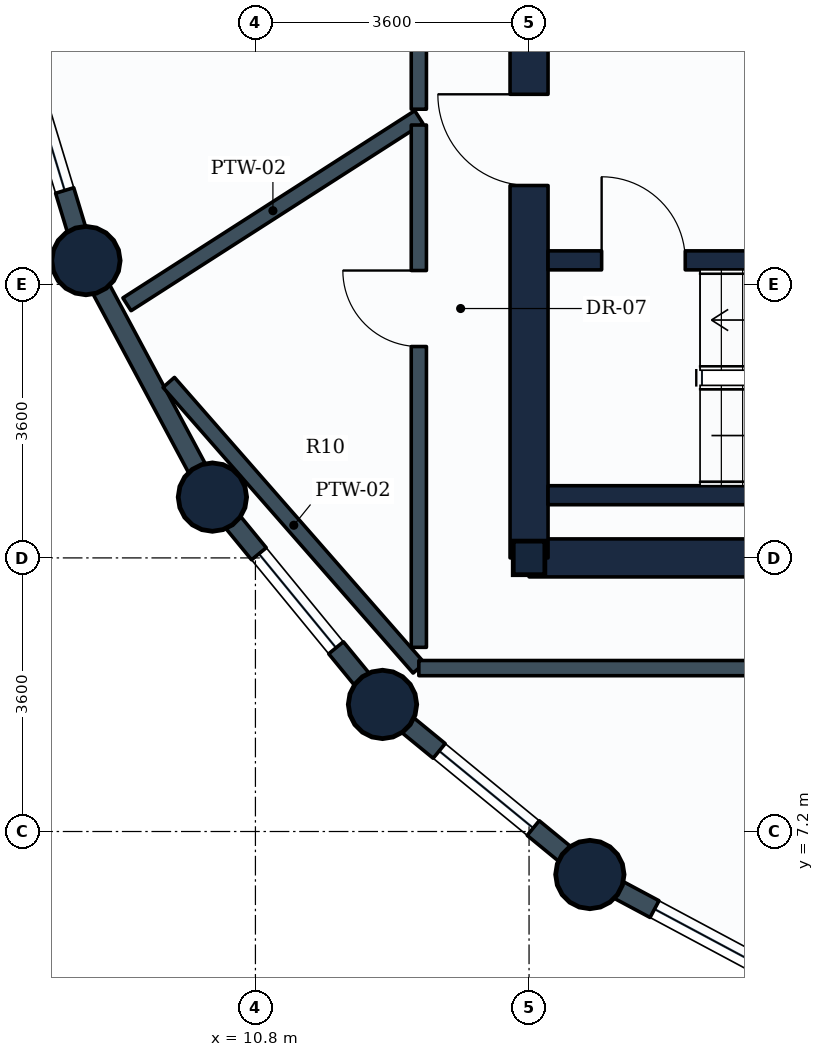
"""IFC4 building model, lengths in metres.
Left out: names, types, materials, properties, quantities, classifications, styles, units other than length and angle.
Written with IfcOpenShell. Run it as: python <this file> out.ifc"""

import sys

from ifc_helpers import new_model, si_unit, direction, frame, frame_2d, origin, origin_2d, place, context, subcontext, project, spatial, rectangle, circle, i_section, extrude, element, fill, save


model = new_model("IFC4")
c1 = context("Model", 3, precision=1e-05, world=origin(), true_north=direction((0.0, 1.0)))
c2 = subcontext(c1, "Body", "Model", "MODEL_VIEW")
j1 = project(units=[si_unit("LENGTHUNIT", "METRE"), si_unit("PLANEANGLEUNIT", "RADIAN")], contexts=[c1])
p1 = place(None, origin())
s1 = spatial("IfcSite", under=j1, at=p1, CompositionType="ELEMENT")
p2 = place(p1, origin())
s2 = spatial("IfcBuilding", under=s1, at=p2, CompositionType="ELEMENT")
p3 = place(p2, frame((0.0, 0.0, 178.6)))
s3 = spatial("IfcBuildingStorey", under=s2, at=p3, CompositionType="ELEMENT", Elevation=178.6)
for number, where, z_axis, x_axis in (
    (1, (8.57, 14.712, 0.0), (0.0, 0.0, 1.0), (1.0, 0.0, 0.0)),
    (2, (10.234, 11.6, 0.0), (0.0, 0.0, 1.0), (1.0, 0.0, 0.0)),
    (3, (12.472, 8.872, 0.0), (0.0, 0.0, 1.0), (1.0, 0.0, 0.0)),
):
    element("IfcColumn", number, at=place(p3, frame(where, z_axis=z_axis, x_axis=x_axis)), inside=s3, PredefinedType="COLUMN", context=c2, shape_type="SweptSolid", body=[
        extrude(circle(Radius=0.45, at=origin_2d()), origin(), (0.0, 0.0, 1.0), 3.8),
    ])
p4 = place(p3, frame((14.4, 10.8, 0.0), z_axis=(0.0, 0.0, 1.0), x_axis=(1.0, 0.0, 0.0)))
e4 = element("IfcColumn", 4, at=p4, inside=s3, PredefinedType="COLUMN", context=c2, shape_type="SweptSolid", body=[
    extrude(i_section(OverallWidth=0.416, OverallDepth=0.442, WebThickness=0.025, FlangeThickness=0.041, FilletRadius=0.015, at=origin_2d()), origin(), (0.0, 0.0, 1.0), 3.8),
])
p5 = place(p3, frame((15.2, 6.634, 0.0), z_axis=(0.0, 0.0, 1.0), x_axis=(1.0, 0.0, 0.0)))
e5 = element("IfcColumn", 5, at=p5, inside=s3, PredefinedType="COLUMN", context=c2, shape_type="SweptSolid", body=[
    extrude(circle(Radius=0.45, at=origin_2d()), origin(), (0.0, 0.0, 1.0), 3.8),
])
p6 = place(p3, frame((8.57, 14.712, 0.0), z_axis=(0.0, 0.0, 1.0), x_axis=(-0.290305086481, 0.956934144423, 0.0)))
e6 = element("IfcWall", 6, at=p6, inside=s3, PredefinedType="STANDARD", context=c2, shape_type="SweptSolid", body=[
    extrude(rectangle(XDim=3.528, YDim=0.25, at=frame_2d((1.764, 0.0))), origin(), (0.0, 0.0, 1.0), 2.93),
])
p7 = place(p6, frame((0.964, 0.0, 0.85)))
e7 = element("IfcOpeningElement", 7, at=p7, cuts=e6, PredefinedType="OPENING", context=c2, shape_type="SweptSolid", body=[
    extrude(rectangle(XDim=1.6, YDim=1.35, at=frame_2d((0.8, 0.675))), frame((0.0, 0.135, 0.0), z_axis=(0.0, -1.0, 0.0), x_axis=(1.0, 0.0, 0.0)), (0.0, 0.0, 1.0), 0.27),
])
p8 = place(p3, frame((10.234, 11.6, 0.0), z_axis=(0.0, 0.0, 1.0), x_axis=(-0.47151087309, 0.881860247748, 0.0)))
e8 = element("IfcWall", 8, at=p8, inside=s3, PredefinedType="STANDARD", context=c2, shape_type="SweptSolid", body=[
    extrude(rectangle(XDim=3.529, YDim=0.25, at=frame_2d((1.764, 0.0))), origin(), (0.0, 0.0, 1.0), 2.93),
])
p9 = place(p3, frame((12.472, 8.872, 0.0), z_axis=(0.0, 0.0, 1.0), x_axis=(-0.634258295121, 0.773121216285, 0.0)))
e9 = element("IfcWall", 9, at=p9, inside=s3, PredefinedType="STANDARD", context=c2, shape_type="SweptSolid", body=[
    extrude(rectangle(XDim=3.529, YDim=0.25, at=frame_2d((1.764, 0.0))), origin(), (0.0, 0.0, 1.0), 2.93),
])
p10 = place(p9, frame((0.964, 0.0, 0.85)))
e10 = element("IfcOpeningElement", 10, at=p10, cuts=e9, PredefinedType="OPENING", context=c2, shape_type="SweptSolid", body=[
    extrude(rectangle(XDim=1.6, YDim=1.35, at=frame_2d((0.8, 0.675))), frame((0.0, 0.135, 0.0), z_axis=(0.0, -1.0, 0.0), x_axis=(1.0, 0.0, 0.0)), (0.0, 0.0, 1.0), 0.27),
])
p11 = place(p3, frame((15.2, 6.634, 0.0), z_axis=(0.0, 0.0, 1.0), x_axis=(-0.773121216285, 0.634258295121, 0.0)))
e11 = element("IfcWall", 11, at=p11, inside=s3, PredefinedType="STANDARD", context=c2, shape_type="SweptSolid", body=[
    extrude(rectangle(XDim=3.529, YDim=0.25, at=frame_2d((1.764, 0.0))), origin(), (0.0, 0.0, 1.0), 2.93),
])
p12 = place(p11, frame((0.964, 0.0, 0.85)))
e12 = element("IfcOpeningElement", 12, at=p12, cuts=e11, PredefinedType="OPENING", context=c2, shape_type="SweptSolid", body=[
    extrude(rectangle(XDim=1.6, YDim=1.35, at=frame_2d((0.8, 0.675))), frame((0.0, 0.135, 0.0), z_axis=(0.0, -1.0, 0.0), x_axis=(1.0, 0.0, 0.0)), (0.0, 0.0, 1.0), 0.27),
])
p13 = place(p3, frame((18.312, 4.97, 0.0), z_axis=(0.0, 0.0, 1.0), x_axis=(-0.881846862014, 0.471535907389, 0.0)))
e13 = element("IfcWall", 13, at=p13, inside=s3, PredefinedType="STANDARD", context=c2, shape_type="SweptSolid", body=[
    extrude(rectangle(XDim=3.529, YDim=0.25, at=frame_2d((1.765, 0.0))), origin(), (0.0, 0.0, 1.0), 2.93),
])
p14 = place(p13, frame((0.964, 0.0, 0.85)))
e14 = element("IfcOpeningElement", 14, at=p14, cuts=e13, PredefinedType="OPENING", context=c2, shape_type="SweptSolid", body=[
    extrude(rectangle(XDim=1.6, YDim=1.35, at=frame_2d((0.8, 0.675))), frame((0.0, 0.135, 0.0), z_axis=(0.0, -1.0, 0.0), x_axis=(1.0, 0.0, 0.0)), (0.0, 0.0, 1.0), 0.27),
])
p15 = place(p3, frame((14.4, 10.8, 0.0), z_axis=(0.0, 0.0, 1.0), x_axis=(1.0, 0.0, 0.0)))
e15 = element("IfcWall", 15, at=p15, inside=s3, PredefinedType="SHEAR", context=c2, shape_type="SweptSolid", body=[
    extrude(rectangle(XDim=18.0, YDim=0.5, at=frame_2d((9.0, 0.0))), origin(), (0.0, 0.0, 1.0), 3.55),
])
p16 = place(p3, frame((14.4, 10.8, 0.0), z_axis=(0.0, 0.0, 1.0), x_axis=(0.0, 1.0, 0.0)))
e16 = element("IfcWall", 16, at=p16, inside=s3, PredefinedType="SHEAR", context=c2, shape_type="SweptSolid", body=[
    extrude(rectangle(XDim=14.4, YDim=0.5, at=frame_2d((7.2, 0.0))), origin(), (0.0, 0.0, 1.0), 3.55),
])
p17 = place(p16, frame((11.05, 0.0, 0.0)))
e17 = element("IfcOpeningElement", 17, at=p17, cuts=e16, PredefinedType="OPENING", context=c2, shape_type="SweptSolid", body=[
    extrude(rectangle(XDim=1.1, YDim=2.1, at=frame_2d((0.55, 1.05))), frame((0.0, 0.26, 0.0), z_axis=(0.0, -1.0, 0.0), x_axis=(1.0, 0.0, 0.0)), (0.0, 0.0, 1.0), 0.52),
])
p18 = place(p16, frame((4.9, 0.0, 0.0)))
e18 = element("IfcOpeningElement", 18, at=p18, cuts=e16, PredefinedType="OPENING", context=c2, shape_type="SweptSolid", body=[
    extrude(rectangle(XDim=1.2, YDim=2.1, at=frame_2d((0.6, 1.05))), frame((0.0, 0.26, 0.0), z_axis=(0.0, -1.0, 0.0), x_axis=(1.0, 0.0, 0.0)), (0.0, 0.0, 1.0), 0.52),
])
p19 = place(p16, frame((7.5, 0.0, 0.0)))
e19 = element("IfcOpeningElement", 19, at=p19, cuts=e16, PredefinedType="OPENING", context=c2, shape_type="SweptSolid", body=[
    extrude(rectangle(XDim=0.85, YDim=2.1, at=frame_2d((0.425, 1.05))), frame((0.0, 0.26, 0.0), z_axis=(0.0, -1.0, 0.0), x_axis=(1.0, 0.0, 0.0)), (0.0, 0.0, 1.0), 0.52),
])
p20 = place(p3, frame((14.65, 11.625, 0.0), z_axis=(0.0, 0.0, 1.0), x_axis=(1.0, 0.0, 0.0)))
e20 = element("IfcWall", 20, at=p20, inside=s3, PredefinedType="SHEAR", context=c2, shape_type="SweptSolid", body=[
    extrude(rectangle(XDim=8.7, YDim=0.25, at=frame_2d((4.35, 0.0))), origin(), (0.0, 0.0, 1.0), 3.55),
])
p21 = place(p3, frame((14.65, 14.715, 0.0), z_axis=(0.0, 0.0, 1.0), x_axis=(1.0, 0.0, 0.0)))
e21 = element("IfcWall", 21, at=p21, inside=s3, PredefinedType="SHEAR", context=c2, shape_type="SweptSolid", body=[
    extrude(rectangle(XDim=8.7, YDim=0.25, at=frame_2d((4.35, 0.0))), origin(), (0.0, 0.0, 1.0), 3.55),
])
p22 = place(p21, frame((0.705, 0.0, 0.0)))
e22 = element("IfcOpeningElement", 22, at=p22, cuts=e21, PredefinedType="OPENING", context=c2, shape_type="SweptSolid", body=[
    extrude(rectangle(XDim=1.1, YDim=2.1, at=frame_2d((0.55, 1.05))), frame((0.0, 0.135, 0.0), z_axis=(0.0, -1.0, 0.0), x_axis=(1.0, 0.0, 0.0)), (0.0, 0.0, 1.0), 0.27),
])
p23 = place(p3, frame((12.95, 9.35, 0.0), z_axis=(0.0, 0.0, 1.0), x_axis=(-0.658639514157, 0.752458630352, 0.0)))
e23 = element("IfcWall", 23, at=p23, inside=s3, PredefinedType="PARTITIONING", context=c2, shape_type="SweptSolid", body=[
    extrude(rectangle(XDim=4.996, YDim=0.2, at=frame_2d((2.498, 0.0))), origin(), (0.0, 0.0, 1.0), 2.93),
])
p24 = place(p3, frame((12.95, 16.6, 0.0), z_axis=(0.0, 0.0, 1.0), x_axis=(-0.841685822078, -0.539967570242, 0.0)))
e24 = element("IfcWall", 24, at=p24, inside=s3, PredefinedType="PARTITIONING", context=c2, shape_type="SweptSolid", body=[
    extrude(rectangle(XDim=4.562, YDim=0.2, at=frame_2d((2.281, 0.0))), origin(), (0.0, 0.0, 1.0), 2.93),
])
p25 = place(p3, frame((12.95, 16.704, 0.0), z_axis=(0.0, 0.0, 1.0), x_axis=(0.0, 1.0, 0.0)))
e25 = element("IfcWall", 25, at=p25, inside=s3, PredefinedType="PARTITIONING", context=c2, shape_type="SweptSolid", body=[
    extrude(rectangle(XDim=8.417, YDim=0.2, at=frame_2d((4.208, 0.0))), origin(), (0.0, 0.0, 1.0), 3.22),
])
p26 = place(p25, frame((3.696, 0.0, 0.0)))
e26 = element("IfcOpeningElement", 26, at=p26, cuts=e25, PredefinedType="OPENING", context=c2, shape_type="SweptSolid", body=[
    extrude(rectangle(XDim=1.0, YDim=2.1, at=frame_2d((0.5, 1.05))), frame((0.0, 0.11, 0.0), z_axis=(0.0, -1.0, 0.0), x_axis=(1.0, 0.0, 0.0)), (0.0, 0.0, 1.0), 0.22),
])
p27 = place(p3, frame((12.95, 9.623, 0.0), z_axis=(0.0, 0.0, 1.0), x_axis=(0.0, 1.0, 0.0)))
e27 = element("IfcWall", 27, at=p27, inside=s3, PredefinedType="PARTITIONING", context=c2, shape_type="SweptSolid", body=[
    extrude(rectangle(XDim=6.873, YDim=0.2, at=frame_2d((3.437, 0.0))), origin(), (0.0, 0.0, 1.0), 3.17),
])
p28 = place(p27, frame((3.958, 0.0, 0.0)))
e28 = element("IfcOpeningElement", 28, at=p28, cuts=e27, PredefinedType="OPENING", context=c2, shape_type="SweptSolid", body=[
    extrude(rectangle(XDim=1.0, YDim=2.1, at=frame_2d((0.5, 1.05))), frame((0.0, 0.11, 0.0), z_axis=(0.0, -1.0, 0.0), x_axis=(1.0, 0.0, 0.0)), (0.0, 0.0, 1.0), 0.22),
])
p29 = place(p3, frame((12.95, 9.35, 0.0), z_axis=(0.0, 0.0, 1.0), x_axis=(1.0, 0.0, 0.0)))
e29 = element("IfcWall", 29, at=p29, inside=s3, PredefinedType="PARTITIONING", context=c2, shape_type="SweptSolid", body=[
    extrude(rectangle(XDim=15.771, YDim=0.2, at=frame_2d((7.885, 0.0))), origin(), (0.0, 0.0, 1.0), 3.17),
])
p30 = place(p29, frame((4.836, 0.0, 0.0)))
e30 = element("IfcOpeningElement", 30, at=p30, cuts=e29, PredefinedType="OPENING", context=c2, shape_type="SweptSolid", body=[
    extrude(rectangle(XDim=1.0, YDim=2.1, at=frame_2d((0.5, 1.05))), frame((0.0, 0.11, 0.0), z_axis=(0.0, -1.0, 0.0), x_axis=(1.0, 0.0, 0.0)), (0.0, 0.0, 1.0), 0.22),
])
p31 = place(p7, origin())
e31 = element("IfcWindow", 31, at=p31, inside=s3, PartitioningType="SINGLE_PANEL", PredefinedType="WINDOW", context=c2, shape_type="SweptSolid", body=[
    extrude(rectangle(XDim=1.6, YDim=1.35, at=frame_2d((0.8, 0.675))), frame((0.0, 0.03, 0.0), z_axis=(0.0, -1.0, 0.0), x_axis=(1.0, 0.0, 0.0)), (0.0, 0.0, 1.0), 0.06),
])
fill(e7, e31)
p32 = place(p10, origin())
e32 = element("IfcWindow", 32, at=p32, inside=s3, PartitioningType="SINGLE_PANEL", PredefinedType="WINDOW", context=c2, shape_type="SweptSolid", body=[
    extrude(rectangle(XDim=1.6, YDim=1.35, at=frame_2d((0.8, 0.675))), frame((0.0, 0.03, 0.0), z_axis=(0.0, -1.0, 0.0), x_axis=(1.0, 0.0, 0.0)), (0.0, 0.0, 1.0), 0.06),
])
fill(e10, e32)
p33 = place(p12, origin())
e33 = element("IfcWindow", 33, at=p33, inside=s3, PartitioningType="SINGLE_PANEL", PredefinedType="WINDOW", context=c2, shape_type="SweptSolid", body=[
    extrude(rectangle(XDim=1.6, YDim=1.35, at=frame_2d((0.8, 0.675))), frame((0.0, 0.03, 0.0), z_axis=(0.0, -1.0, 0.0), x_axis=(1.0, 0.0, 0.0)), (0.0, 0.0, 1.0), 0.06),
])
fill(e12, e33)
p34 = place(p14, origin())
e34 = element("IfcWindow", 34, at=p34, inside=s3, PartitioningType="SINGLE_PANEL", PredefinedType="WINDOW", context=c2, shape_type="SweptSolid", body=[
    extrude(rectangle(XDim=1.6, YDim=1.35, at=frame_2d((0.8, 0.675))), frame((0.0, 0.03, 0.0), z_axis=(0.0, -1.0, 0.0), x_axis=(1.0, 0.0, 0.0)), (0.0, 0.0, 1.0), 0.06),
])
fill(e14, e34)
p35 = place(p22, origin())
e35 = element("IfcDoor", 35, at=p35, inside=s3, OperationType="SINGLE_SWING_LEFT", PredefinedType="DOOR", context=c2, shape_type="SweptSolid", body=[
    extrude(rectangle(XDim=1.1, YDim=2.1, at=frame_2d((0.55, 1.05))), frame((0.0, 0.025, 0.0), z_axis=(0.0, -1.0, 0.0), x_axis=(1.0, 0.0, 0.0)), (0.0, 0.0, 1.0), 0.05),
])
fill(e22, e35)
p36 = place(p18, origin())
e36 = element("IfcDoor", 36, at=p36, inside=s3, OperationType="SINGLE_SWING_RIGHT", PredefinedType="DOOR", context=c2, shape_type="SweptSolid", body=[
    extrude(rectangle(XDim=1.2, YDim=2.1, at=frame_2d((0.6, 1.05))), frame((0.0, 0.025, 0.0), z_axis=(0.0, -1.0, 0.0), x_axis=(1.0, 0.0, 0.0)), (0.0, 0.0, 1.0), 0.05),
])
fill(e18, e36)
p37 = place(p28, origin())
e37 = element("IfcDoor", 37, at=p37, inside=s3, OperationType="SINGLE_SWING_RIGHT", PredefinedType="DOOR", context=c2, shape_type="SweptSolid", body=[
    extrude(rectangle(XDim=1.0, YDim=2.1, at=frame_2d((0.5, 1.05))), frame((0.0, 0.025, 0.0), z_axis=(0.0, -1.0, 0.0), x_axis=(1.0, 0.0, 0.0)), (0.0, 0.0, 1.0), 0.05),
])
fill(e28, e37)
save(model, sys.argv[1])
